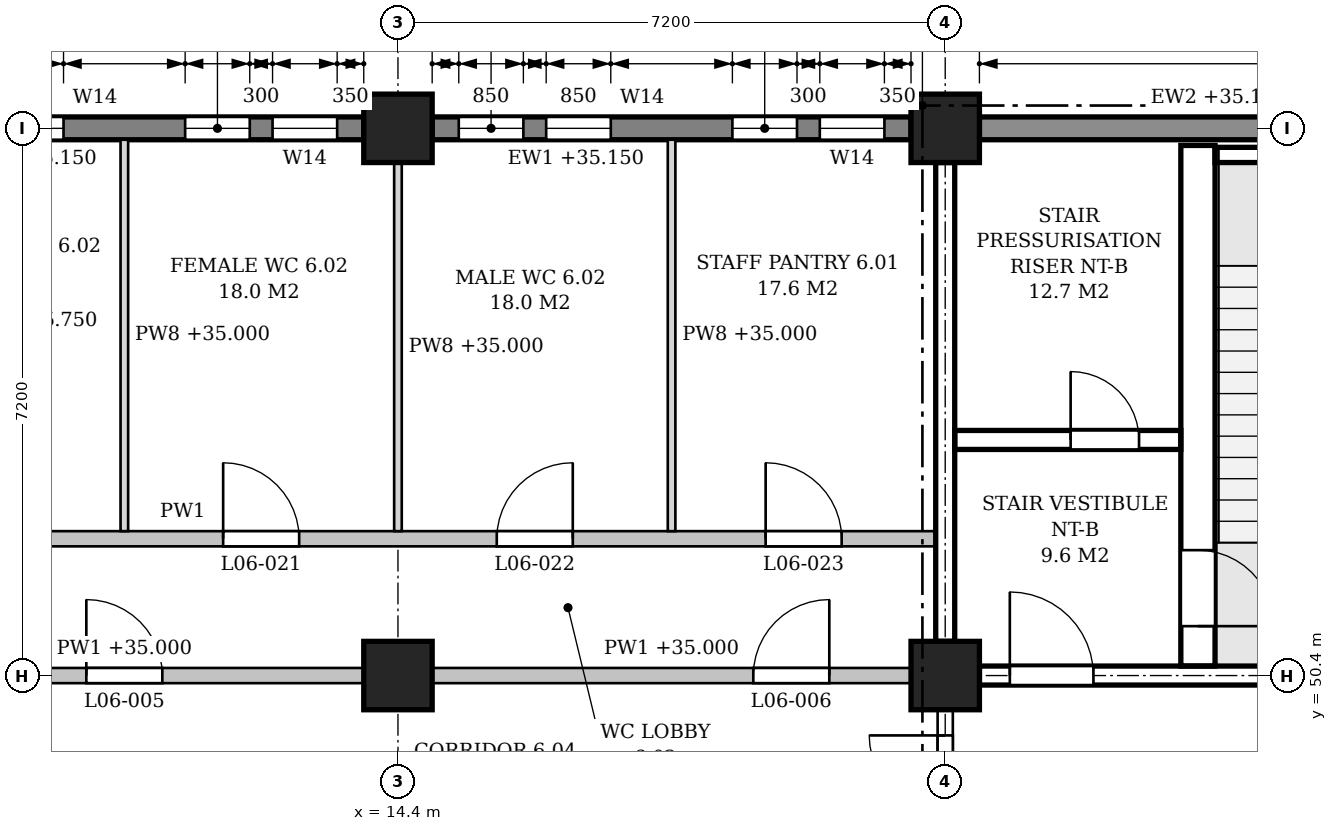
"""IFC4 building model, lengths in metres.
Left out: names, types, materials, properties, quantities, classifications, styles, units other than length and angle.
Written with IfcOpenShell. Run it as: python <this file> out.ifc"""

import sys

from ifc_helpers import new_model, si_unit, direction, frame, frame_2d, origin, origin_2d, place, context, subcontext, project, spatial, polyline, rectangle, outline, extrude, element, fill, save


model = new_model("IFC4")
c1 = context("Model", 3, precision=1e-05, world=origin(), true_north=direction((0.0, 1.0)))
c2 = subcontext(c1, "Body", "Model", "MODEL_VIEW")
j1 = project(units=[si_unit("LENGTHUNIT", "METRE"), si_unit("PLANEANGLEUNIT", "RADIAN")], contexts=[c1])
p1 = place(None, origin())
s1 = spatial("IfcSite", under=j1, at=p1, CompositionType="ELEMENT")
p2 = place(p1, origin())
s2 = spatial("IfcBuilding", under=s1, at=p2, CompositionType="ELEMENT")
p3 = place(p2, frame((0.0, 0.0, 31.2)))
s3 = spatial("IfcBuildingStorey", under=s2, at=p3, CompositionType="ELEMENT", Elevation=31.2)
for number, where, z_axis, x_axis in (
    (1, (14.4, 50.4, 0.0), (0.0, 0.0, 1.0), (1.0, 0.0, 0.0)),
    (2, (14.4, 57.6, 0.0), (0.0, 0.0, 1.0), (1.0, 0.0, 0.0)),
    (3, (21.6, 50.4, 0.0), (0.0, 0.0, 1.0), (1.0, 0.0, 0.0)),
    (4, (21.6, 57.6, 0.0), (0.0, 0.0, 1.0), (1.0, 0.0, 0.0)),
):
    element("IfcColumn", number, at=place(p3, frame(where, z_axis=z_axis, x_axis=x_axis)), inside=s3, PredefinedType="COLUMN", context=c2, shape_type="SweptSolid", body=[
        extrude(rectangle(XDim=0.9, YDim=0.9, at=origin_2d()), origin(), (0.0, 0.0, 1.0), 4.8),
    ])
p4 = place(p3, frame((28.35, 57.6, 0.0), z_axis=(0.0, 0.0, 1.0), x_axis=(-1.0, 0.0, 0.0)))
e5 = element("IfcWall", 5, at=p4, inside=s3, PredefinedType="STANDARD", context=c2, shape_type="SweptSolid", body=[
    extrude(rectangle(XDim=6.3, YDim=0.3, at=frame_2d((3.15, 0.0))), origin(), (0.0, 0.0, 1.0), 3.95),
])
p5 = place(p4, frame((0.9, 0.0, 0.9)))
e6 = element("IfcOpeningElement", 6, at=p5, cuts=e5, PredefinedType="OPENING", context=c2, shape_type="SweptSolid", body=[
    extrude(outline(polyline([(0.0, 0.0), (0.9, 0.0), (0.9, 2.05), (0.45, 2.5), (0.0, 2.05), (0.0, 0.0)])), frame((0.0, 0.16, 0.0), z_axis=(0.0, -1.0, 0.0), x_axis=(1.0, 0.0, 0.0)), (0.0, 0.0, 1.0), 0.32),
])
p6 = place(p3, frame((21.15, 57.6, 0.0), z_axis=(0.0, 0.0, 1.0), x_axis=(-1.0, 0.0, 0.0)))
e7 = element("IfcWall", 7, at=p6, inside=s3, PredefinedType="STANDARD", context=c2, shape_type="SweptSolid", body=[
    extrude(rectangle(XDim=6.3, YDim=0.3, at=frame_2d((3.15, 0.0))), origin(), (0.0, 0.0, 1.0), 3.95),
])
p7 = place(p6, frame((0.35, 0.0, 0.9)))
e8 = element("IfcOpeningElement", 8, at=p7, cuts=e7, PredefinedType="OPENING", context=c2, shape_type="SweptSolid", body=[
    extrude(outline(polyline([(0.0, 0.0), (0.85, 0.0), (0.85, 2.05), (0.425, 2.5), (0.0, 2.05), (0.0, 0.0)])), frame((0.0, 0.16, 0.0), z_axis=(0.0, -1.0, 0.0), x_axis=(1.0, 0.0, 0.0)), (0.0, 0.0, 1.0), 0.32),
])
p8 = place(p6, frame((1.5, 0.0, 0.9)))
e9 = element("IfcOpeningElement", 9, at=p8, cuts=e7, PredefinedType="OPENING", context=c2, shape_type="SweptSolid", body=[
    extrude(outline(polyline([(0.0, 0.0), (0.85, 0.0), (0.85, 2.05), (0.425, 2.5), (0.0, 2.05), (0.0, 0.0)])), frame((0.0, 0.16, 0.0), z_axis=(0.0, -1.0, 0.0), x_axis=(1.0, 0.0, 0.0)), (0.0, 0.0, 1.0), 0.32),
])
p9 = place(p6, frame((3.95, 0.0, 0.9)))
e10 = element("IfcOpeningElement", 10, at=p9, cuts=e7, PredefinedType="OPENING", context=c2, shape_type="SweptSolid", body=[
    extrude(outline(polyline([(0.0, 0.0), (0.85, 0.0), (0.85, 2.05), (0.425, 2.5), (0.0, 2.05), (0.0, 0.0)])), frame((0.0, 0.16, 0.0), z_axis=(0.0, -1.0, 0.0), x_axis=(1.0, 0.0, 0.0)), (0.0, 0.0, 1.0), 0.32),
])
p10 = place(p6, frame((5.1, 0.0, 0.9)))
e11 = element("IfcOpeningElement", 11, at=p10, cuts=e7, PredefinedType="OPENING", context=c2, shape_type="SweptSolid", body=[
    extrude(outline(polyline([(0.0, 0.0), (0.85, 0.0), (0.85, 2.05), (0.425, 2.5), (0.0, 2.05), (0.0, 0.0)])), frame((0.0, 0.16, 0.0), z_axis=(0.0, -1.0, 0.0), x_axis=(1.0, 0.0, 0.0)), (0.0, 0.0, 1.0), 0.32),
])
p11 = place(p3, frame((13.95, 57.6, 0.0), z_axis=(0.0, 0.0, 1.0), x_axis=(-1.0, 0.0, 0.0)))
e12 = element("IfcWall", 12, at=p11, inside=s3, PredefinedType="STANDARD", context=c2, shape_type="SweptSolid", body=[
    extrude(rectangle(XDim=6.3, YDim=0.3, at=frame_2d((3.15, 0.0))), origin(), (0.0, 0.0, 1.0), 3.95),
])
p12 = place(p11, frame((0.35, 0.0, 0.9)))
e13 = element("IfcOpeningElement", 13, at=p12, cuts=e12, PredefinedType="OPENING", context=c2, shape_type="SweptSolid", body=[
    extrude(outline(polyline([(0.0, 0.0), (0.85, 0.0), (0.85, 2.05), (0.425, 2.5), (0.0, 2.05), (0.0, 0.0)])), frame((0.0, 0.16, 0.0), z_axis=(0.0, -1.0, 0.0), x_axis=(1.0, 0.0, 0.0)), (0.0, 0.0, 1.0), 0.32),
])
p13 = place(p11, frame((1.5, 0.0, 0.9)))
e14 = element("IfcOpeningElement", 14, at=p13, cuts=e12, PredefinedType="OPENING", context=c2, shape_type="SweptSolid", body=[
    extrude(outline(polyline([(0.0, 0.0), (0.85, 0.0), (0.85, 2.05), (0.425, 2.5), (0.0, 2.05), (0.0, 0.0)])), frame((0.0, 0.16, 0.0), z_axis=(0.0, -1.0, 0.0), x_axis=(1.0, 0.0, 0.0)), (0.0, 0.0, 1.0), 0.32),
])
p14 = place(p11, frame((3.95, 0.0, 0.9)))
e15 = element("IfcOpeningElement", 15, at=p14, cuts=e12, PredefinedType="OPENING", context=c2, shape_type="SweptSolid", body=[
    extrude(outline(polyline([(0.0, 0.0), (0.85, 0.0), (0.85, 2.05), (0.425, 2.5), (0.0, 2.05), (0.0, 0.0)])), frame((0.0, 0.16, 0.0), z_axis=(0.0, -1.0, 0.0), x_axis=(1.0, 0.0, 0.0)), (0.0, 0.0, 1.0), 0.32),
])
p15 = place(p11, frame((5.1, 0.0, 0.9)))
e16 = element("IfcOpeningElement", 16, at=p15, cuts=e12, PredefinedType="OPENING", context=c2, shape_type="SweptSolid", body=[
    extrude(outline(polyline([(0.0, 0.0), (0.85, 0.0), (0.85, 2.05), (0.425, 2.5), (0.0, 2.05), (0.0, 0.0)])), frame((0.0, 0.16, 0.0), z_axis=(0.0, -1.0, 0.0), x_axis=(1.0, 0.0, 0.0)), (0.0, 0.0, 1.0), 0.32),
])
p16 = place(p3, frame((22.05, 50.4, 0.0), z_axis=(0.0, 0.0, 1.0), x_axis=(1.0, 0.0, 0.0)))
e17 = element("IfcWall", 17, at=p16, inside=s3, PredefinedType="SHEAR", context=c2, shape_type="SweptSolid", body=[
    extrude(rectangle(XDim=6.3, YDim=0.25, at=frame_2d((3.15, 0.0))), origin(), (0.0, 0.0, 1.0), 3.8),
])
p17 = place(p16, frame((0.4, 0.0, 0.0)))
e18 = element("IfcOpeningElement", 18, at=p17, cuts=e17, PredefinedType="OPENING", context=c2, shape_type="SweptSolid", body=[
    extrude(rectangle(XDim=1.1, YDim=2.1, at=frame_2d((0.55, 1.05))), frame((0.0, 0.135, 0.0), z_axis=(0.0, -1.0, 0.0), x_axis=(1.0, 0.0, 0.0)), (0.0, 0.0, 1.0), 0.27),
])
p18 = place(p3, frame((21.6, 50.85, 0.0), z_axis=(0.0, 0.0, 1.0), x_axis=(0.0, 1.0, 0.0)))
e19 = element("IfcWall", 19, at=p18, inside=s3, PredefinedType="SHEAR", context=c2, shape_type="SweptSolid", body=[
    extrude(rectangle(XDim=6.3, YDim=0.25, at=frame_2d((3.15, 0.0))), origin(), (0.0, 0.0, 1.0), 3.8),
])
p19 = place(p3, frame((25.15, 57.25, -0.25), z_axis=(0.0, 0.0, 1.0), x_axis=(1.0, 0.0, 0.0)))
e20 = element("IfcWall", 20, at=p19, inside=s3, PredefinedType="SHEAR", context=c2, shape_type="SweptSolid", body=[
    extrude(rectangle(XDim=1.4, YDim=0.2, at=frame_2d((0.7, 0.0))), origin(), (0.0, 0.0, 1.0), 4.8),
])
p20 = place(p3, frame((24.925, 50.525, 0.0), z_axis=(0.0, 0.0, 1.0), x_axis=(0.0, 1.0, 0.0)))
e21 = element("IfcWall", 21, at=p20, inside=s3, PredefinedType="SHEAR", context=c2, shape_type="SweptSolid", body=[
    extrude(rectangle(XDim=6.85, YDim=0.45, at=frame_2d((3.425, 0.0))), origin(), (0.0, 0.0, 1.0), 4.55),
])
p21 = place(p20, frame((0.525, 0.0, 0.0)))
e22 = element("IfcOpeningElement", 22, at=p21, cuts=e21, PredefinedType="OPENING", context=c2, shape_type="SweptSolid", body=[
    extrude(rectangle(XDim=1.0, YDim=2.1, at=frame_2d((0.5, 1.05))), frame((0.0, 0.235, 0.0), z_axis=(0.0, -1.0, 0.0), x_axis=(1.0, 0.0, 0.0)), (0.0, 0.0, 1.0), 0.47),
])
p22 = place(p3, frame((21.725, 53.5, 0.0), z_axis=(0.0, 0.0, 1.0), x_axis=(1.0, 0.0, 0.0)))
e23 = element("IfcWall", 23, at=p22, inside=s3, PredefinedType="SHEAR", context=c2, shape_type="SweptSolid", body=[
    extrude(rectangle(XDim=2.975, YDim=0.25, at=frame_2d((1.487, 0.0))), origin(), (0.0, 0.0, 1.0), 4.55),
])
p23 = place(p22, frame((1.525, 0.0, 0.0)))
e24 = element("IfcOpeningElement", 24, at=p23, cuts=e23, PredefinedType="OPENING", context=c2, shape_type="SweptSolid", body=[
    extrude(rectangle(XDim=0.9, YDim=2.1, at=frame_2d((0.45, 1.05))), frame((0.0, 0.135, 0.0), z_axis=(0.0, -1.0, 0.0), x_axis=(1.0, 0.0, 0.0)), (0.0, 0.0, 1.0), 0.27),
])
p24 = place(p3, frame((7.65, 50.4, 0.0), z_axis=(0.0, 0.0, 1.0), x_axis=(1.0, 0.0, 0.0)))
e25 = element("IfcWall", 25, at=p24, inside=s3, PredefinedType="PARTITIONING", context=c2, shape_type="SweptSolid", body=[
    extrude(rectangle(XDim=6.3, YDim=0.2, at=frame_2d((3.15, 0.0))), origin(), (0.0, 0.0, 1.0), 3.8),
])
p25 = place(p24, frame((2.65, 0.0, 0.0)))
e26 = element("IfcOpeningElement", 26, at=p25, cuts=e25, PredefinedType="OPENING", context=c2, shape_type="SweptSolid", body=[
    extrude(rectangle(XDim=1.0, YDim=2.1, at=frame_2d((0.5, 1.05))), frame((0.0, 0.11, 0.0), z_axis=(0.0, -1.0, 0.0), x_axis=(1.0, 0.0, 0.0)), (0.0, 0.0, 1.0), 0.22),
])
p26 = place(p3, frame((14.85, 50.4, 0.0), z_axis=(0.0, 0.0, 1.0), x_axis=(1.0, 0.0, 0.0)))
e27 = element("IfcWall", 27, at=p26, inside=s3, PredefinedType="PARTITIONING", context=c2, shape_type="SweptSolid", body=[
    extrude(rectangle(XDim=6.3, YDim=0.2, at=frame_2d((3.15, 0.0))), origin(), (0.0, 0.0, 1.0), 3.8),
])
p27 = place(p26, frame((4.225, 0.0, 0.0)))
e28 = element("IfcOpeningElement", 28, at=p27, cuts=e27, PredefinedType="OPENING", context=c2, shape_type="SweptSolid", body=[
    extrude(rectangle(XDim=1.0, YDim=2.1, at=frame_2d((0.5, 1.05))), frame((0.0, 0.11, 0.0), z_axis=(0.0, -1.0, 0.0), x_axis=(1.0, 0.0, 0.0)), (0.0, 0.0, 1.0), 0.22),
])
p28 = place(p3, frame((7.325, 52.2, 0.0), z_axis=(0.0, 0.0, 1.0), x_axis=(1.0, 0.0, 0.0)))
e29 = element("IfcWall", 29, at=p28, inside=s3, PredefinedType="PARTITIONING", context=c2, shape_type="SweptSolid", body=[
    extrude(outline(polyline([(0.0, 0.0), (14.15, 0.0), (14.15, 3.8), (14.025, 3.8), (14.025, 4.55), (7.325, 4.55), (7.325, 3.8), (6.825, 3.8), (6.825, 4.55), (0.125, 4.55), (0.125, 3.8), (0.0, 3.8), (0.0, 0.0)])), frame((0.0, 0.1, 0.0), z_axis=(0.0, -1.0, 0.0), x_axis=(1.0, 0.0, 0.0)), (0.0, 0.0, 1.0), 0.2),
])
p29 = place(p28, frame((1.238, 0.0, 0.0)))
e30 = element("IfcOpeningElement", 30, at=p29, cuts=e29, PredefinedType="OPENING", context=c2, shape_type="SweptSolid", body=[
    extrude(rectangle(XDim=1.0, YDim=2.1, at=frame_2d((0.5, 1.05))), frame((0.0, 0.11, 0.0), z_axis=(0.0, -1.0, 0.0), x_axis=(1.0, 0.0, 0.0)), (0.0, 0.0, 1.0), 0.22),
])
p30 = place(p28, frame((4.775, 0.0, 0.0)))
e31 = element("IfcOpeningElement", 31, at=p30, cuts=e29, PredefinedType="OPENING", context=c2, shape_type="SweptSolid", body=[
    extrude(rectangle(XDim=1.0, YDim=2.1, at=frame_2d((0.5, 1.05))), frame((0.0, 0.11, 0.0), z_axis=(0.0, -1.0, 0.0), x_axis=(1.0, 0.0, 0.0)), (0.0, 0.0, 1.0), 0.22),
])
p31 = place(p28, frame((8.375, 0.0, 0.0)))
e32 = element("IfcOpeningElement", 32, at=p31, cuts=e29, PredefinedType="OPENING", context=c2, shape_type="SweptSolid", body=[
    extrude(rectangle(XDim=1.0, YDim=2.1, at=frame_2d((0.5, 1.05))), frame((0.0, 0.11, 0.0), z_axis=(0.0, -1.0, 0.0), x_axis=(1.0, 0.0, 0.0)), (0.0, 0.0, 1.0), 0.22),
])
p32 = place(p28, frame((11.913, 0.0, 0.0)))
e33 = element("IfcOpeningElement", 33, at=p32, cuts=e29, PredefinedType="OPENING", context=c2, shape_type="SweptSolid", body=[
    extrude(rectangle(XDim=1.0, YDim=2.1, at=frame_2d((0.5, 1.05))), frame((0.0, 0.11, 0.0), z_axis=(0.0, -1.0, 0.0), x_axis=(1.0, 0.0, 0.0)), (0.0, 0.0, 1.0), 0.22),
])
p33 = place(p3, frame((10.8, 52.3, 0.0), z_axis=(0.0, 0.0, 1.0), x_axis=(0.0, 1.0, 0.0)))
e34 = element("IfcWall", 34, at=p33, inside=s3, PredefinedType="PARTITIONING", context=c2, shape_type="SweptSolid", body=[
    extrude(rectangle(XDim=5.15, YDim=0.1, at=frame_2d((2.575, 0.0))), origin(), (0.0, 0.0, 1.0), 3.8),
])
p34 = place(p3, frame((14.4, 52.3, 0.0), z_axis=(0.0, 0.0, 1.0), x_axis=(0.0, 1.0, 0.0)))
e35 = element("IfcWall", 35, at=p34, inside=s3, PredefinedType="PARTITIONING", context=c2, shape_type="SweptSolid", body=[
    extrude(rectangle(XDim=4.85, YDim=0.1, at=frame_2d((2.425, 0.0))), origin(), (0.0, 0.0, 1.0), 3.8),
])
p35 = place(p3, frame((18.0, 52.3, 0.0), z_axis=(0.0, 0.0, 1.0), x_axis=(0.0, 1.0, 0.0)))
e36 = element("IfcWall", 36, at=p35, inside=s3, PredefinedType="PARTITIONING", context=c2, shape_type="SweptSolid", body=[
    extrude(rectangle(XDim=5.15, YDim=0.1, at=frame_2d((2.575, 0.0))), origin(), (0.0, 0.0, 1.0), 3.8),
])
p36 = place(p3, frame((21.6, 47.275, 0.0), z_axis=(0.0, 0.0, 1.0), x_axis=(0.0, 1.0, 0.0)))
e37 = element("IfcWall", 37, at=p36, inside=s3, PredefinedType="PARTITIONING", context=c2, shape_type="SweptSolid", body=[
    extrude(rectangle(XDim=2.675, YDim=0.2, at=frame_2d((1.337, 0.0))), origin(), (0.0, 0.0, 1.0), 3.8),
])
p37 = place(p36, frame((0.337, 0.0, 0.0)))
e38 = element("IfcOpeningElement", 38, at=p37, cuts=e37, PredefinedType="OPENING", context=c2, shape_type="SweptSolid", body=[
    extrude(rectangle(XDim=2.0, YDim=2.4, at=frame_2d((1.0, 1.2))), frame((0.0, 0.11, 0.0), z_axis=(0.0, -1.0, 0.0), x_axis=(1.0, 0.0, 0.0)), (0.0, 0.0, 1.0), 0.22),
])
p38 = place(p7, origin())
e39 = element("IfcWindow", 39, at=p38, inside=s3, PartitioningType="SINGLE_PANEL", PredefinedType="WINDOW", context=c2, shape_type="SweptSolid", body=[
    extrude(outline(polyline([(0.0, 0.0), (0.85, 0.0), (0.85, 2.05), (0.425, 2.5), (0.0, 2.05), (0.0, 0.0)])), frame((0.0, 0.03, 0.0), z_axis=(0.0, -1.0, 0.0), x_axis=(1.0, 0.0, 0.0)), (0.0, 0.0, 1.0), 0.06),
])
fill(e8, e39)
p39 = place(p8, origin())
e40 = element("IfcWindow", 40, at=p39, inside=s3, PartitioningType="SINGLE_PANEL", PredefinedType="WINDOW", context=c2, shape_type="SweptSolid", body=[
    extrude(outline(polyline([(0.0, 0.0), (0.85, 0.0), (0.85, 2.05), (0.425, 2.5), (0.0, 2.05), (0.0, 0.0)])), frame((0.0, 0.03, 0.0), z_axis=(0.0, -1.0, 0.0), x_axis=(1.0, 0.0, 0.0)), (0.0, 0.0, 1.0), 0.06),
])
fill(e9, e40)
p40 = place(p9, origin())
e41 = element("IfcWindow", 41, at=p40, inside=s3, PartitioningType="SINGLE_PANEL", PredefinedType="WINDOW", context=c2, shape_type="SweptSolid", body=[
    extrude(outline(polyline([(0.0, 0.0), (0.85, 0.0), (0.85, 2.05), (0.425, 2.5), (0.0, 2.05), (0.0, 0.0)])), frame((0.0, 0.03, 0.0), z_axis=(0.0, -1.0, 0.0), x_axis=(1.0, 0.0, 0.0)), (0.0, 0.0, 1.0), 0.06),
])
fill(e10, e41)
p41 = place(p10, origin())
e42 = element("IfcWindow", 42, at=p41, inside=s3, PartitioningType="SINGLE_PANEL", PredefinedType="WINDOW", context=c2, shape_type="SweptSolid", body=[
    extrude(outline(polyline([(0.0, 0.0), (0.85, 0.0), (0.85, 2.05), (0.425, 2.5), (0.0, 2.05), (0.0, 0.0)])), frame((0.0, 0.03, 0.0), z_axis=(0.0, -1.0, 0.0), x_axis=(1.0, 0.0, 0.0)), (0.0, 0.0, 1.0), 0.06),
])
fill(e11, e42)
p42 = place(p12, origin())
e43 = element("IfcWindow", 43, at=p42, inside=s3, PartitioningType="SINGLE_PANEL", PredefinedType="WINDOW", context=c2, shape_type="SweptSolid", body=[
    extrude(outline(polyline([(0.0, 0.0), (0.85, 0.0), (0.85, 2.05), (0.425, 2.5), (0.0, 2.05), (0.0, 0.0)])), frame((0.0, 0.03, 0.0), z_axis=(0.0, -1.0, 0.0), x_axis=(1.0, 0.0, 0.0)), (0.0, 0.0, 1.0), 0.06),
])
fill(e13, e43)
p43 = place(p13, origin())
e44 = element("IfcWindow", 44, at=p43, inside=s3, PartitioningType="SINGLE_PANEL", PredefinedType="WINDOW", context=c2, shape_type="SweptSolid", body=[
    extrude(outline(polyline([(0.0, 0.0), (0.85, 0.0), (0.85, 2.05), (0.425, 2.5), (0.0, 2.05), (0.0, 0.0)])), frame((0.0, 0.03, 0.0), z_axis=(0.0, -1.0, 0.0), x_axis=(1.0, 0.0, 0.0)), (0.0, 0.0, 1.0), 0.06),
])
fill(e14, e44)
p44 = place(p14, origin())
e45 = element("IfcWindow", 45, at=p44, inside=s3, PartitioningType="SINGLE_PANEL", PredefinedType="WINDOW", context=c2, shape_type="SweptSolid", body=[
    extrude(outline(polyline([(0.0, 0.0), (0.85, 0.0), (0.85, 2.05), (0.425, 2.5), (0.0, 2.05), (0.0, 0.0)])), frame((0.0, 0.03, 0.0), z_axis=(0.0, -1.0, 0.0), x_axis=(1.0, 0.0, 0.0)), (0.0, 0.0, 1.0), 0.06),
])
fill(e15, e45)
p45 = place(p21, frame((1.0, 0.0, 0.0), z_axis=(0.0, 0.0, 1.0), x_axis=(-1.0, 0.0, 0.0)))
e46 = element("IfcDoor", 46, at=p45, inside=s3, OperationType="SINGLE_SWING_RIGHT", PredefinedType="DOOR", context=c2, shape_type="SweptSolid", body=[
    extrude(rectangle(XDim=1.0, YDim=2.1, at=frame_2d((0.5, 1.05))), frame((0.0, 0.025, 0.0), z_axis=(0.0, -1.0, 0.0), x_axis=(1.0, 0.0, 0.0)), (0.0, 0.0, 1.0), 0.05),
])
fill(e22, e46)
p46 = place(p17, origin())
e47 = element("IfcDoor", 47, at=p46, inside=s3, OperationType="SINGLE_SWING_LEFT", PredefinedType="DOOR", context=c2, shape_type="SweptSolid", body=[
    extrude(rectangle(XDim=1.1, YDim=2.1, at=frame_2d((0.55, 1.05))), frame((0.0, 0.025, 0.0), z_axis=(0.0, -1.0, 0.0), x_axis=(1.0, 0.0, 0.0)), (0.0, 0.0, 1.0), 0.05),
])
fill(e18, e47)
p47 = place(p23, origin())
e48 = element("IfcDoor", 48, at=p47, inside=s3, OperationType="SINGLE_SWING_LEFT", PredefinedType="DOOR", context=c2, shape_type="SweptSolid", body=[
    extrude(rectangle(XDim=0.9, YDim=2.1, at=frame_2d((0.45, 1.05))), frame((0.0, 0.025, 0.0), z_axis=(0.0, -1.0, 0.0), x_axis=(1.0, 0.0, 0.0)), (0.0, 0.0, 1.0), 0.05),
])
fill(e24, e48)
p48 = place(p37, origin())
e49 = element("IfcDoor", 49, at=p48, inside=s3, OperationType="DOUBLE_DOOR_SINGLE_SWING", PredefinedType="DOOR", context=c2, shape_type="SweptSolid", body=[
    extrude(rectangle(XDim=2.0, YDim=2.4, at=frame_2d((1.0, 1.2))), frame((0.0, 0.025, 0.0), z_axis=(0.0, -1.0, 0.0), x_axis=(1.0, 0.0, 0.0)), (0.0, 0.0, 1.0), 0.05),
])
fill(e38, e49)
p49 = place(p25, origin())
e50 = element("IfcDoor", 50, at=p49, inside=s3, OperationType="SINGLE_SWING_LEFT", PredefinedType="DOOR", context=c2, shape_type="SweptSolid", body=[
    extrude(rectangle(XDim=1.0, YDim=2.1, at=frame_2d((0.5, 1.05))), frame((0.0, 0.025, 0.0), z_axis=(0.0, -1.0, 0.0), x_axis=(1.0, 0.0, 0.0)), (0.0, 0.0, 1.0), 0.05),
])
fill(e26, e50)
p50 = place(p27, origin())
e51 = element("IfcDoor", 51, at=p50, inside=s3, OperationType="SINGLE_SWING_RIGHT", PredefinedType="DOOR", context=c2, shape_type="SweptSolid", body=[
    extrude(rectangle(XDim=1.0, YDim=2.1, at=frame_2d((0.5, 1.05))), frame((0.0, 0.025, 0.0), z_axis=(0.0, -1.0, 0.0), x_axis=(1.0, 0.0, 0.0)), (0.0, 0.0, 1.0), 0.05),
])
fill(e28, e51)
p51 = place(p30, origin())
e52 = element("IfcDoor", 52, at=p51, inside=s3, OperationType="SINGLE_SWING_LEFT", PredefinedType="DOOR", context=c2, shape_type="SweptSolid", body=[
    extrude(rectangle(XDim=1.0, YDim=2.1, at=frame_2d((0.5, 1.05))), frame((0.0, 0.025, 0.0), z_axis=(0.0, -1.0, 0.0), x_axis=(1.0, 0.0, 0.0)), (0.0, 0.0, 1.0), 0.05),
])
fill(e31, e52)
p52 = place(p31, origin())
e53 = element("IfcDoor", 53, at=p52, inside=s3, OperationType="SINGLE_SWING_RIGHT", PredefinedType="DOOR", context=c2, shape_type="SweptSolid", body=[
    extrude(rectangle(XDim=1.0, YDim=2.1, at=frame_2d((0.5, 1.05))), frame((0.0, 0.025, 0.0), z_axis=(0.0, -1.0, 0.0), x_axis=(1.0, 0.0, 0.0)), (0.0, 0.0, 1.0), 0.05),
])
fill(e32, e53)
p53 = place(p32, origin())
e54 = element("IfcDoor", 54, at=p53, inside=s3, OperationType="SINGLE_SWING_LEFT", PredefinedType="DOOR", context=c2, shape_type="SweptSolid", body=[
    extrude(rectangle(XDim=1.0, YDim=2.1, at=frame_2d((0.5, 1.05))), frame((0.0, 0.025, 0.0), z_axis=(0.0, -1.0, 0.0), x_axis=(1.0, 0.0, 0.0)), (0.0, 0.0, 1.0), 0.05),
])
fill(e33, e54)
save(model, sys.argv[1])
